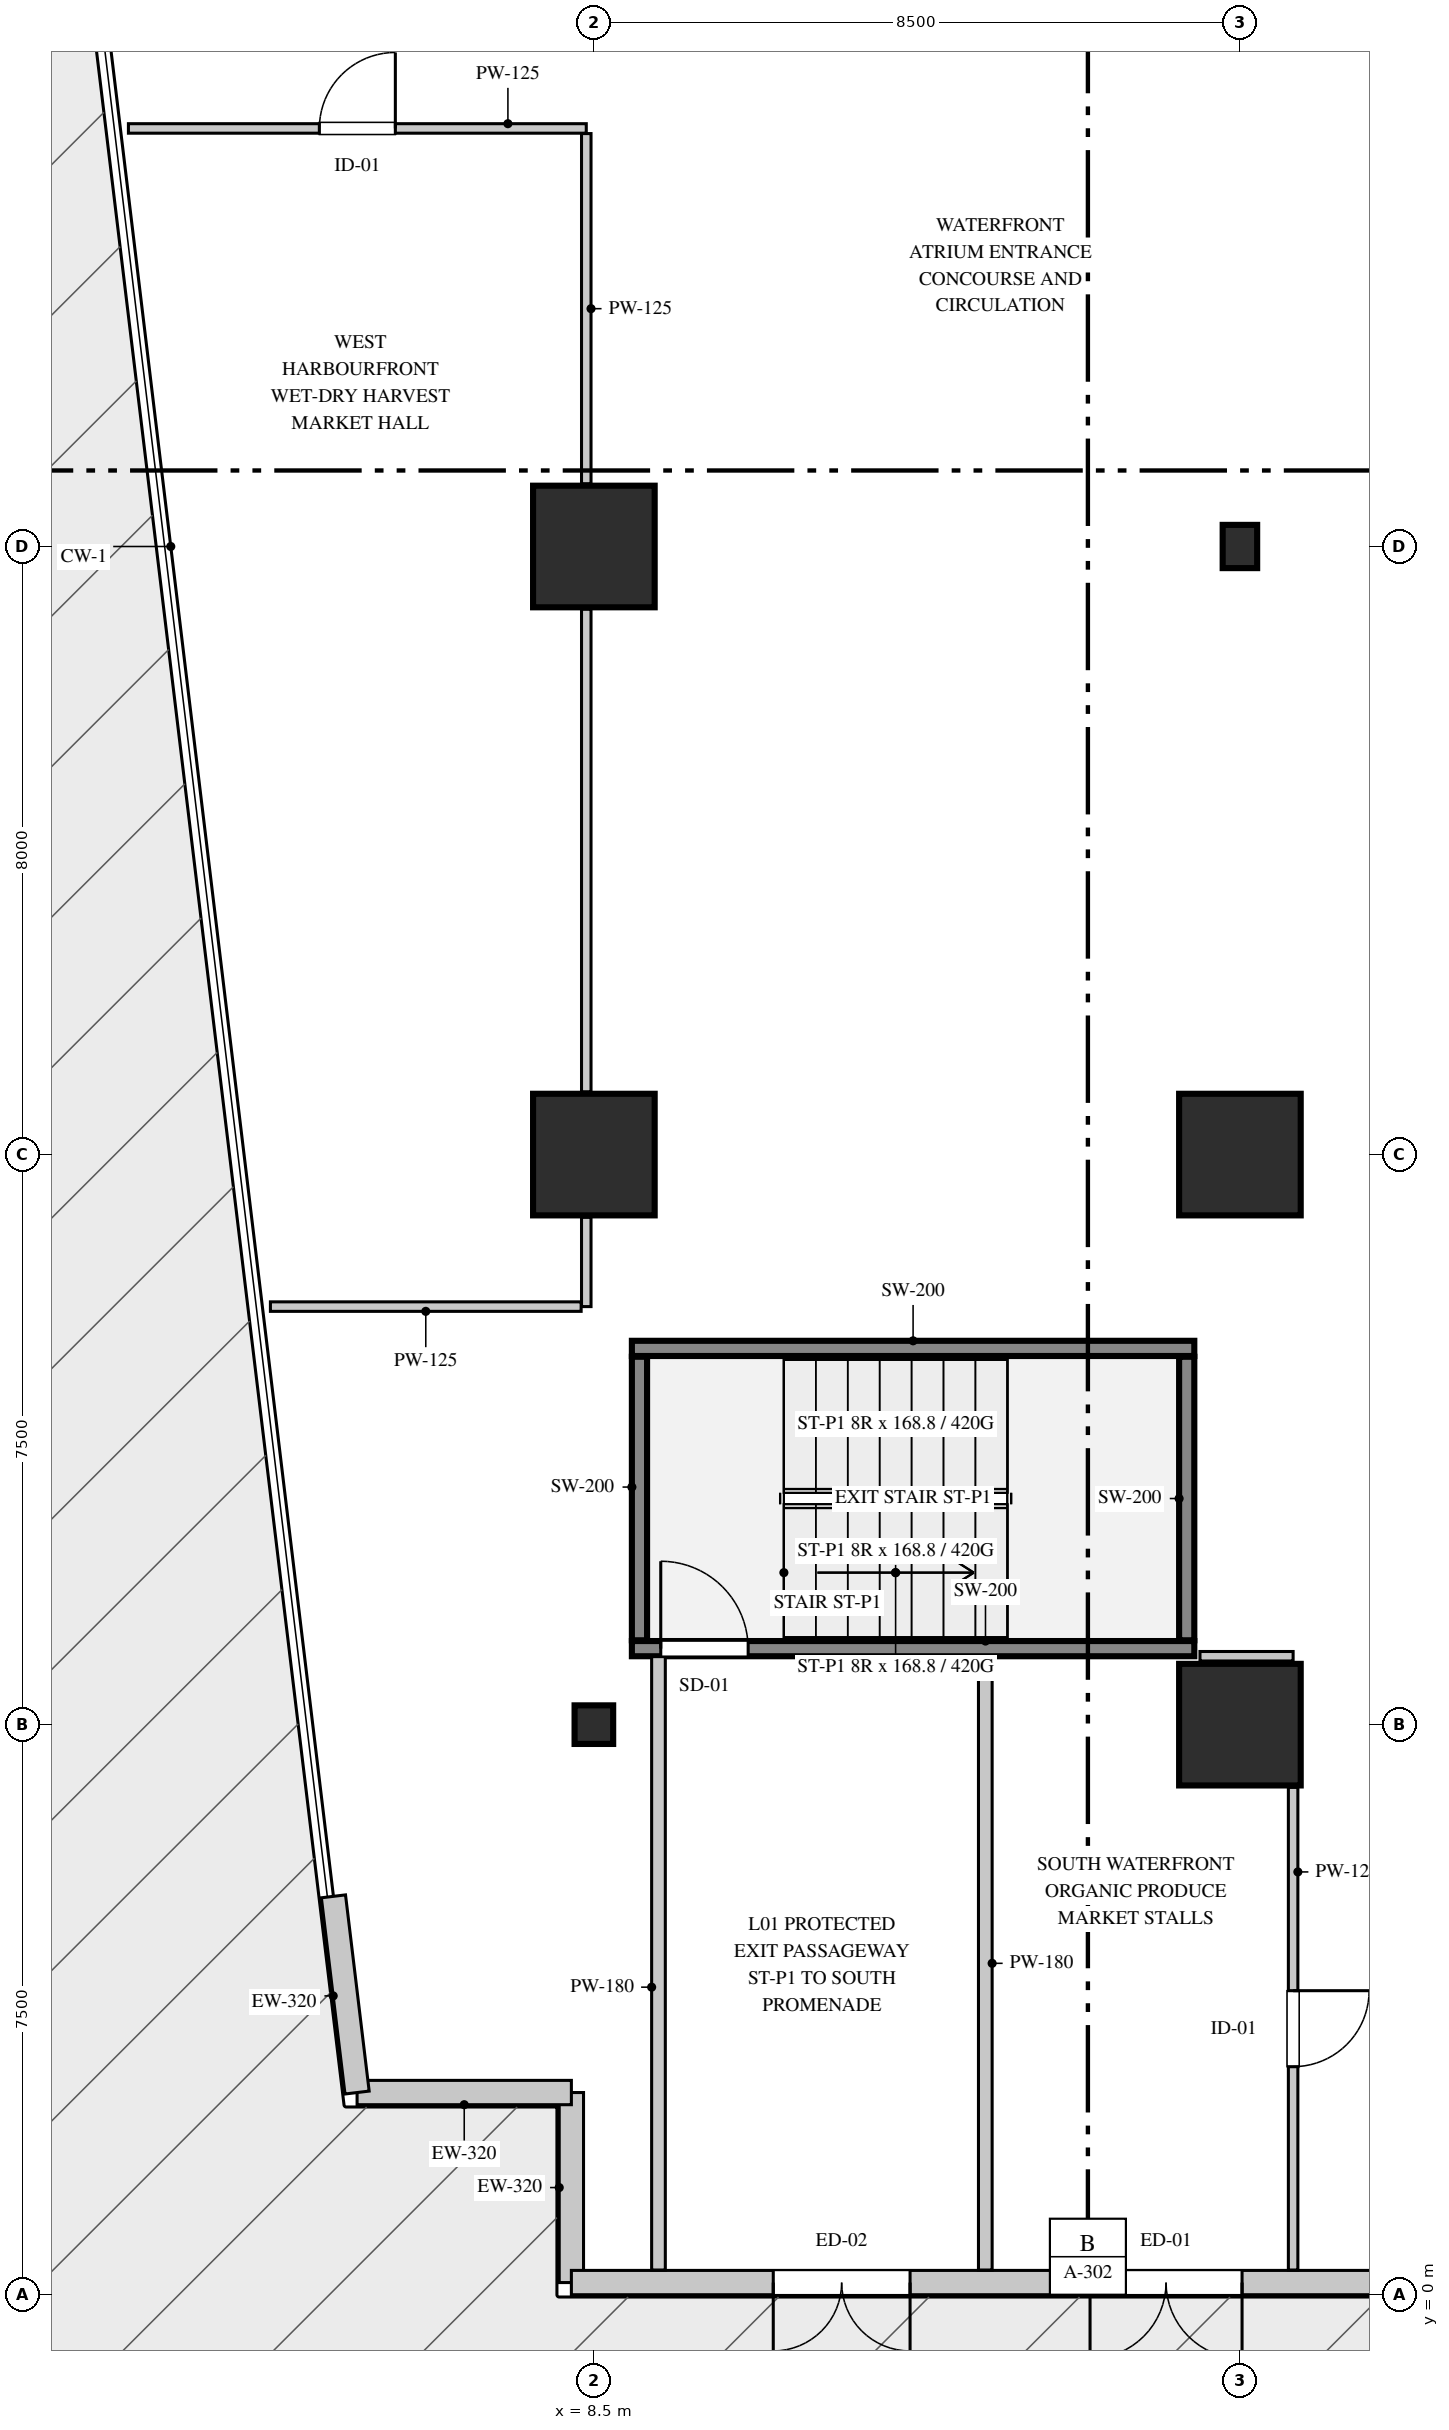
"""IFC4 building model, lengths in metres.
Left out: names, types, materials, properties, quantities, classifications, styles, units other than length and angle.
Written with IfcOpenShell. Run it as: python <this file> out.ifc"""

import sys

from ifc_helpers import new_model, si_unit, direction, frame, frame_2d, origin, origin_2d, place, context, subcontext, project, spatial, rectangle, hollow_circle, i_section, extrude, element, fill, save


model = new_model("IFC4")
c1 = context("Model", 3, precision=1e-05, world=origin(), true_north=direction((0.0, 1.0)))
c2 = subcontext(c1, "Body", "Model", "MODEL_VIEW")
j1 = project(units=[si_unit("LENGTHUNIT", "METRE"), si_unit("PLANEANGLEUNIT", "RADIAN")], contexts=[c1])
p1 = place(None, origin())
s1 = spatial("IfcSite", under=j1, at=p1, CompositionType="ELEMENT")
p2 = place(p1, origin())
s2 = spatial("IfcBuilding", under=s1, at=p2, CompositionType="ELEMENT")
p3 = place(p2, origin())
s3 = spatial("IfcBuildingStorey", under=s2, at=p3, CompositionType="ELEMENT", Elevation=0.0)
p4 = place(p3, frame((9.0, 8.5, 0.0), z_axis=(0.0, 0.0, 1.0), x_axis=(1.0, 0.0, 0.0)))
e1 = element("IfcWall", 1, at=p4, inside=s3, PredefinedType="SHEAR", context=c2, shape_type="SweptSolid", body=[
    extrude(rectangle(XDim=7.4, YDim=0.2, at=frame_2d((3.7, 0.0))), origin(), (0.0, 0.0, 1.0), 5.4),
])
p5 = place(p4, frame((0.38, 0.0, 0.0)))
e2 = element("IfcOpeningElement", 2, at=p5, cuts=e1, PredefinedType="OPENING", context=c2, shape_type="SweptSolid", body=[
    extrude(rectangle(XDim=1.15, YDim=2.2, at=frame_2d((0.575, 1.1))), frame((0.0, 0.11, 0.0), z_axis=(0.0, -1.0, 0.0), x_axis=(1.0, 0.0, 0.0)), (0.0, 0.0, 1.0), 0.22),
])
p6 = place(p3, frame((9.0, 12.45, 0.0), z_axis=(0.0, 0.0, 1.0), x_axis=(1.0, 0.0, 0.0)))
e3 = element("IfcWall", 3, at=p6, inside=s3, PredefinedType="SHEAR", context=c2, shape_type="SweptSolid", body=[
    extrude(rectangle(XDim=7.4, YDim=0.2, at=frame_2d((3.7, 0.0))), origin(), (0.0, 0.0, 1.0), 5.4),
])
for number, where, z_axis, x_axis in (
    (4, (9.1, 8.61, 0.0), (0.0, 0.0, 1.0), (0.0, 1.0, 0.0)),
    (5, (16.3, 8.61, 0.0), (0.0, 0.0, 1.0), (0.0, 1.0, 0.0)),
):
    element("IfcWall", number, at=place(p3, frame(where, z_axis=z_axis, x_axis=x_axis)), inside=s3, PredefinedType="SHEAR", context=c2, shape_type="SweptSolid", body=[
        extrude(rectangle(XDim=3.73, YDim=0.2, at=frame_2d((1.865, 0.0))), origin(), (0.0, 0.0, 1.0), 5.4),
    ])
p7 = place(p3, frame((8.5, 7.5, 0.0), z_axis=(0.0, 0.0, 1.0), x_axis=(1.0, 0.0, 0.0)))
e6 = element("IfcColumn", 6, at=p7, inside=s3, PredefinedType="COLUMN", context=c2, shape_type="SweptSolid", body=[
    extrude(hollow_circle(Radius=0.254, WallThickness=0.025, at=origin_2d()), origin(), (0.0, 0.0, 1.0), 5.4),
])
for number, where, z_axis, x_axis in (
    (7, (8.5, 15.0, 0.0), (0.0, 0.0, 1.0), (1.0, 0.0, 0.0)),
    (8, (8.5, 23.0, 0.0), (0.0, 0.0, 1.0), (1.0, 0.0, 0.0)),
    (9, (17.0, 7.5, 0.0), (0.0, 0.0, 1.0), (1.0, 0.0, 0.0)),
    (10, (17.0, 15.0, 0.0), (0.0, 0.0, 1.0), (1.0, 0.0, 0.0)),
):
    element("IfcColumn", number, at=place(p3, frame(where, z_axis=z_axis, x_axis=x_axis)), inside=s3, PredefinedType="COLUMN", context=c2, shape_type="SweptSolid", body=[
        extrude(rectangle(XDim=1.6, YDim=1.6, at=origin_2d()), origin(), (0.0, 0.0, 1.0), 5.4),
    ])
p8 = place(p3, frame((17.0, 23.0, 0.0), z_axis=(0.0, 0.0, 1.0), x_axis=(1.0, 0.0, 0.0)))
e11 = element("IfcColumn", 11, at=p8, inside=s3, PredefinedType="COLUMN", context=c2, shape_type="SweptSolid", body=[
    extrude(i_section(OverallWidth=0.454, OverallDepth=0.569, WebThickness=0.078, FlangeThickness=0.08, FilletRadius=0.015, at=origin_2d()), origin(), (0.0, 0.0, 1.0), 5.4),
])
p9 = place(p3, frame((8.204, 0.16, 0.0), z_axis=(0.0, 0.0, 1.0), x_axis=(0.0, 1.0, 0.0)))
e12 = element("IfcWall", 12, at=p9, inside=s3, PredefinedType="STANDARD", context=c2, shape_type="SweptSolid", body=[
    extrude(rectangle(XDim=2.5, YDim=0.32, at=frame_2d((1.25, 0.0))), origin(), (0.0, 0.0, 1.0), 5.08),
])
p10 = place(p3, frame((8.204, 2.66, 0.0), z_axis=(0.0, 0.0, 1.0), x_axis=(-1.0, 0.0, 0.0)))
e13 = element("IfcWall", 13, at=p10, inside=s3, PredefinedType="STANDARD", context=c2, shape_type="SweptSolid", body=[
    extrude(rectangle(XDim=2.82, YDim=0.32, at=frame_2d((1.41, 0.0))), origin(), (0.0, 0.0, 1.0), 5.08),
])
p11 = place(p3, frame((5.385, 2.66, 0.0), z_axis=(0.0, 0.0, 1.0), x_axis=(-0.119630264411, 0.992818513041, 0.0)))
e14 = element("IfcWall", 14, at=p11, inside=s3, PredefinedType="STANDARD", context=c2, shape_type="SweptSolid", body=[
    extrude(rectangle(XDim=2.6, YDim=0.32, at=frame_2d((1.3, 0.0))), origin(), (0.0, 0.0, 1.0), 5.08),
])
p12 = place(p3, frame((25.987, 0.16, 0.0), z_axis=(0.0, 0.0, 1.0), x_axis=(-1.0, 0.0, 0.0)))
e15 = element("IfcWall", 15, at=p12, inside=s3, PredefinedType="STANDARD", context=c2, shape_type="SweptSolid", body=[
    extrude(rectangle(XDim=17.783, YDim=0.32, at=frame_2d((8.892, 0.0))), origin(), (0.0, 0.0, 1.0), 5.08),
])
p13 = place(p12, frame((13.327, 0.0, 0.0)))
e16 = element("IfcOpeningElement", 16, at=p13, cuts=e15, PredefinedType="OPENING", context=c2, shape_type="SweptSolid", body=[
    extrude(rectangle(XDim=1.8, YDim=2.4, at=frame_2d((0.9, 1.2))), frame((0.0, 0.17, 0.0), z_axis=(0.0, -1.0, 0.0), x_axis=(1.0, 0.0, 0.0)), (0.0, 0.0, 1.0), 0.34),
])
p14 = place(p12, frame((8.959, 0.0, 0.0)))
e17 = element("IfcOpeningElement", 17, at=p14, cuts=e15, PredefinedType="OPENING", context=c2, shape_type="SweptSolid", body=[
    extrude(rectangle(XDim=2.0, YDim=2.4, at=frame_2d((1.0, 1.2))), frame((0.0, 0.17, 0.0), z_axis=(0.0, -1.0, 0.0), x_axis=(1.0, 0.0, 0.0)), (0.0, 0.0, 1.0), 0.34),
])
for number, where, z_axis, x_axis in (
    (18, (9.35, 0.325, 0.0), (0.0, 0.0, 1.0), (0.0, 1.0, 0.0)),
    (19, (13.65, 8.395, 0.0), (0.0, 0.0, 1.0), (0.0, -1.0, 0.0)),
):
    element("IfcWall", number, at=place(p3, frame(where, z_axis=z_axis, x_axis=x_axis)), inside=s3, PredefinedType="PARTITIONING", context=c2, shape_type="SweptSolid", body=[
        extrude(rectangle(XDim=8.07, YDim=0.18, at=frame_2d((4.035, 0.0))), origin(), (0.0, 0.0, 1.0), 5.08),
    ])
p15 = place(p3, frame((2.376, 28.5, 0.0), z_axis=(0.0, 0.0, 1.0), x_axis=(1.0, 0.0, 0.0)))
e20 = element("IfcWall", 20, at=p15, inside=s3, PredefinedType="PARTITIONING", context=c2, shape_type="SweptSolid", body=[
    extrude(rectangle(XDim=6.024, YDim=0.125, at=frame_2d((3.012, 0.0))), origin(), (0.0, 0.0, 1.0), 5.08),
])
p16 = place(p15, frame((2.512, 0.0, 0.0)))
e21 = element("IfcOpeningElement", 21, at=p16, cuts=e20, PredefinedType="OPENING", context=c2, shape_type="SweptSolid", body=[
    extrude(rectangle(XDim=1.0, YDim=2.15, at=frame_2d((0.5, 1.075))), frame((0.0, 0.073, 0.0), z_axis=(0.0, -1.0, 0.0), x_axis=(1.0, 0.0, 0.0)), (0.0, 0.0, 1.0), 0.145),
])
p17 = place(p3, frame((8.4, 28.433, 0.0), z_axis=(0.0, 0.0, 1.0), x_axis=(0.0, -1.0, 0.0)))
e22 = element("IfcWall", 22, at=p17, inside=s3, PredefinedType="PARTITIONING", context=c2, shape_type="SweptSolid", body=[
    extrude(rectangle(XDim=4.608, YDim=0.125, at=frame_2d((2.304, 0.0))), origin(), (0.0, 0.0, 1.0), 4.265),
])
p18 = place(p3, frame((8.4, 22.175, 0.0), z_axis=(0.0, 0.0, 1.0), x_axis=(0.0, -1.0, 0.0)))
e23 = element("IfcWall", 23, at=p18, inside=s3, PredefinedType="PARTITIONING", context=c2, shape_type="SweptSolid", body=[
    extrude(rectangle(XDim=6.35, YDim=0.125, at=frame_2d((3.175, 0.0))), origin(), (0.0, 0.0, 1.0), 4.265),
])
p19 = place(p3, frame((8.4, 14.175, 0.0), z_axis=(0.0, 0.0, 1.0), x_axis=(0.0, -1.0, 0.0)))
e24 = element("IfcWall", 24, at=p19, inside=s3, PredefinedType="PARTITIONING", context=c2, shape_type="SweptSolid", body=[
    extrude(rectangle(XDim=1.175, YDim=0.125, at=frame_2d((0.587, 0.0))), origin(), (0.0, 0.0, 1.0), 4.265),
])
p20 = place(p3, frame((8.333, 13.0, 0.0), z_axis=(0.0, 0.0, 1.0), x_axis=(-1.0, 0.0, 0.0)))
e25 = element("IfcWall", 25, at=p20, inside=s3, PredefinedType="PARTITIONING", context=c2, shape_type="SweptSolid", body=[
    extrude(rectangle(XDim=4.088, YDim=0.125, at=frame_2d((2.044, 0.0))), origin(), (0.0, 0.0, 1.0), 5.08),
])
p21 = place(p3, frame((17.7, 6.675, 0.0), z_axis=(0.0, 0.0, 1.0), x_axis=(0.0, -1.0, 0.0)))
e26 = element("IfcWall", 26, at=p21, inside=s3, PredefinedType="PARTITIONING", context=c2, shape_type="SweptSolid", body=[
    extrude(rectangle(XDim=6.35, YDim=0.125, at=frame_2d((3.175, 0.0))), origin(), (0.0, 0.0, 1.0), 5.08),
])
p22 = place(p21, frame((2.675, 0.0, 0.0)))
e27 = element("IfcOpeningElement", 27, at=p22, cuts=e26, PredefinedType="OPENING", context=c2, shape_type="SweptSolid", body=[
    extrude(rectangle(XDim=1.0, YDim=2.15, at=frame_2d((0.5, 1.075))), frame((0.0, 0.073, 0.0), z_axis=(0.0, -1.0, 0.0), x_axis=(1.0, 0.0, 0.0)), (0.0, 0.0, 1.0), 0.145),
])
p23 = place(p3, frame((16.475, 8.4, 0.0), z_axis=(0.0, 0.0, 1.0), x_axis=(1.0, 0.0, 0.0)))
e28 = element("IfcWall", 28, at=p23, inside=s3, PredefinedType="PARTITIONING", context=c2, shape_type="SweptSolid", body=[
    extrude(rectangle(XDim=1.225, YDim=0.125, at=frame_2d((0.613, 0.0))), origin(), (0.0, 0.0, 1.0), 5.08),
])
p24 = place(p13, origin())
e29 = element("IfcDoor", 29, at=p24, inside=s3, OperationType="DOUBLE_DOOR_SINGLE_SWING", PredefinedType="DOOR", context=c2, shape_type="SweptSolid", body=[
    extrude(rectangle(XDim=1.8, YDim=2.4, at=frame_2d((0.9, 1.2))), frame((0.0, 0.025, 0.0), z_axis=(0.0, -1.0, 0.0), x_axis=(1.0, 0.0, 0.0)), (0.0, 0.0, 1.0), 0.05),
])
fill(e16, e29)
p25 = place(p14, origin())
e30 = element("IfcDoor", 30, at=p25, inside=s3, OperationType="DOUBLE_DOOR_SINGLE_SWING", PredefinedType="DOOR", context=c2, shape_type="SweptSolid", body=[
    extrude(rectangle(XDim=2.0, YDim=2.4, at=frame_2d((1.0, 1.2))), frame((0.0, 0.025, 0.0), z_axis=(0.0, -1.0, 0.0), x_axis=(1.0, 0.0, 0.0)), (0.0, 0.0, 1.0), 0.05),
])
fill(e17, e30)
p26 = place(p5, origin())
e31 = element("IfcDoor", 31, at=p26, inside=s3, OperationType="SINGLE_SWING_LEFT", PredefinedType="DOOR", context=c2, shape_type="SweptSolid", body=[
    extrude(rectangle(XDim=1.15, YDim=2.2, at=frame_2d((0.575, 1.1))), frame((0.0, 0.025, 0.0), z_axis=(0.0, -1.0, 0.0), x_axis=(1.0, 0.0, 0.0)), (0.0, 0.0, 1.0), 0.05),
])
fill(e2, e31)
p27 = place(p16, origin())
e32 = element("IfcDoor", 32, at=p27, inside=s3, OperationType="SINGLE_SWING_RIGHT", PredefinedType="DOOR", context=c2, shape_type="SweptSolid", body=[
    extrude(rectangle(XDim=1.0, YDim=2.15, at=frame_2d((0.5, 1.075))), frame((0.0, 0.025, 0.0), z_axis=(0.0, -1.0, 0.0), x_axis=(1.0, 0.0, 0.0)), (0.0, 0.0, 1.0), 0.05),
])
fill(e21, e32)
p28 = place(p22, origin())
e33 = element("IfcDoor", 33, at=p28, inside=s3, OperationType="SINGLE_SWING_LEFT", PredefinedType="DOOR", context=c2, shape_type="SweptSolid", body=[
    extrude(rectangle(XDim=1.0, YDim=2.15, at=frame_2d((0.5, 1.075))), frame((0.0, 0.025, 0.0), z_axis=(0.0, -1.0, 0.0), x_axis=(1.0, 0.0, 0.0)), (0.0, 0.0, 1.0), 0.05),
])
fill(e27, e33)
save(model, sys.argv[1])
